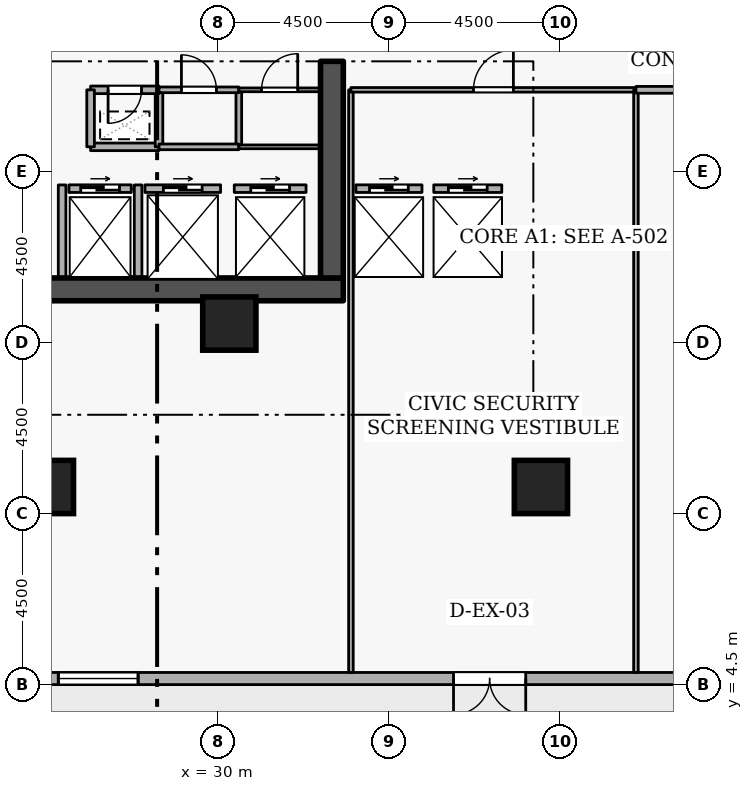
"""IFC4 building model, lengths in metres.
Left out: names, types, materials, properties, quantities, classifications, styles, units other than length and angle.
Written with IfcOpenShell. Run it as: python <this file> out.ifc"""

import sys

from ifc_helpers import new_model, si_unit, direction, frame, frame_2d, origin, origin_2d, place, context, subcontext, project, spatial, rectangle, extrude, element, fill, save


model = new_model("IFC4")
c1 = context("Model", 3, precision=1e-05, world=origin(), true_north=direction((0.0, 1.0)))
c2 = subcontext(c1, "Body", "Model", "MODEL_VIEW")
j1 = project(units=[si_unit("LENGTHUNIT", "METRE"), si_unit("PLANEANGLEUNIT", "RADIAN")], contexts=[c1])
p1 = place(None, origin())
s1 = spatial("IfcSite", under=j1, at=p1, CompositionType="ELEMENT")
p2 = place(p1, origin())
s2 = spatial("IfcBuilding", under=s1, at=p2, CompositionType="ELEMENT")
p3 = place(p2, origin())
s3 = spatial("IfcBuildingStorey", under=s2, at=p3, CompositionType="ELEMENT", Elevation=0.0)
p4 = place(p3, frame((17.7, 14.9, 0.0), z_axis=(0.0, 0.0, 1.0), x_axis=(1.0, 0.0, 0.0)))
e1 = element("IfcWall", 1, at=p4, inside=s3, PredefinedType="SHEAR", context=c2, shape_type="SweptSolid", body=[
    extrude(rectangle(XDim=15.6, YDim=0.6, at=frame_2d((7.8, 0.0))), origin(), (0.0, 0.0, 1.0), 4.8),
])
p5 = place(p3, frame((33.0, 15.2, 0.0), z_axis=(0.0, 0.0, 1.0), x_axis=(0.0, 1.0, 0.0)))
e2 = element("IfcWall", 2, at=p5, inside=s3, PredefinedType="SHEAR", context=c2, shape_type="SweptSolid", body=[
    extrude(rectangle(XDim=5.7, YDim=0.6, at=frame_2d((2.85, 0.0))), origin(), (0.0, 0.0, 1.0), 4.8),
])
for number, where, z_axis, x_axis in (
    (3, (25.5, 9.7, 0.0), (0.0, 0.0, 1.0), (1.0, 0.0, 0.0)),
    (4, (38.5, 9.7, 0.0), (0.0, 0.0, 1.0), (1.0, 0.0, 0.0)),
    (5, (30.3, 14.0, 0.0), (0.0, 0.0, 1.0), (1.0, 0.0, 0.0)),
):
    element("IfcColumn", number, at=place(p3, frame(where, z_axis=z_axis, x_axis=x_axis)), inside=s3, PredefinedType="COLUMN", context=c2, shape_type="SweptSolid", body=[
        extrude(rectangle(XDim=1.4, YDim=1.4, at=origin_2d()), origin(), (0.0, 0.0, 1.0), 4.8),
    ])
p6 = place(p3, frame((3.0, 4.66, 0.0), z_axis=(0.0, 0.0, 1.0), x_axis=(1.0, 0.0, 0.0)))
e6 = element("IfcWall", 6, at=p6, inside=s3, PredefinedType="STANDARD", context=c2, shape_type="SweptSolid", body=[
    extrude(rectangle(XDim=39.4, YDim=0.32, at=frame_2d((19.7, 0.0))), origin(), (0.0, 0.0, 1.0), 3.86),
])
p7 = place(p6, frame((14.3, 0.0, 0.0), z_axis=(0.0, 0.0, 1.0), x_axis=(-1.0, 0.0, 0.0)))
e7 = element("IfcOpeningElement", 7, at=p7, cuts=e6, PredefinedType="OPENING", context=c2, shape_type="SweptSolid", body=[
    extrude(rectangle(XDim=1.9, YDim=2.25, at=frame_2d((0.95, 1.125))), frame((0.0, 0.17, 0.0), z_axis=(0.0, -1.0, 0.0), x_axis=(1.0, 0.0, 0.0)), (0.0, 0.0, 1.0), 0.34),
])
p8 = place(p6, frame((9.1, 0.0, 0.0), z_axis=(0.0, 0.0, 1.0), x_axis=(-1.0, 0.0, 0.0)))
e8 = element("IfcOpeningElement", 8, at=p8, cuts=e6, PredefinedType="OPENING", context=c2, shape_type="SweptSolid", body=[
    extrude(rectangle(XDim=1.9, YDim=2.25, at=frame_2d((0.95, 1.125))), frame((0.0, 0.17, 0.0), z_axis=(0.0, -1.0, 0.0), x_axis=(1.0, 0.0, 0.0)), (0.0, 0.0, 1.0), 0.34),
])
p9 = place(p6, frame((35.1, 0.0, 0.0), z_axis=(0.0, 0.0, 1.0), x_axis=(-1.0, 0.0, 0.0)))
e9 = element("IfcOpeningElement", 9, at=p9, cuts=e6, PredefinedType="OPENING", context=c2, shape_type="SweptSolid", body=[
    extrude(rectangle(XDim=1.9, YDim=2.25, at=frame_2d((0.95, 1.125))), frame((0.0, 0.17, 0.0), z_axis=(0.0, -1.0, 0.0), x_axis=(1.0, 0.0, 0.0)), (0.0, 0.0, 1.0), 0.34),
])
p10 = place(p6, frame((3.0, 0.0, 0.78)))
e10 = element("IfcOpeningElement", 10, at=p10, cuts=e6, PredefinedType="OPENING", context=c2, shape_type="SweptSolid", body=[
    extrude(rectangle(XDim=2.1, YDim=2.4, at=frame_2d((1.05, 1.2))), frame((0.0, 0.17, 0.0), z_axis=(0.0, -1.0, 0.0), x_axis=(1.0, 0.0, 0.0)), (0.0, 0.0, 1.0), 0.34),
])
p11 = place(p6, frame((22.8, 0.0, 0.78)))
e11 = element("IfcOpeningElement", 11, at=p11, cuts=e6, PredefinedType="OPENING", context=c2, shape_type="SweptSolid", body=[
    extrude(rectangle(XDim=2.1, YDim=2.4, at=frame_2d((1.05, 1.2))), frame((0.0, 0.17, 0.0), z_axis=(0.0, -1.0, 0.0), x_axis=(1.0, 0.0, 0.0)), (0.0, 0.0, 1.0), 0.34),
])
p12 = place(p3, frame((26.08, 17.55, 0.0), z_axis=(0.0, 0.0, 1.0), x_axis=(1.0, 0.0, 0.0)))
e12 = element("IfcWall", 12, at=p12, inside=s3, PredefinedType="STANDARD", context=c2, shape_type="SweptSolid", body=[
    extrude(rectangle(XDim=1.64, YDim=0.2, at=frame_2d((0.82, 0.0))), origin(), (0.0, 0.0, 1.0), 4.46),
])
p13 = place(p12, frame((0.31, 0.0, 0.0)))
e13 = element("IfcOpeningElement", 13, at=p13, cuts=e12, PredefinedType="OPENING", context=c2, shape_type="SweptSolid", body=[
    extrude(rectangle(XDim=1.02, YDim=2.06, at=frame_2d((0.51, 1.03))), frame((0.0, 0.11, 0.0), z_axis=(0.0, -1.0, 0.0), x_axis=(1.0, 0.0, 0.0)), (0.0, 0.0, 1.0), 0.22),
])
p14 = place(p3, frame((28.08, 17.55, 0.0), z_axis=(0.0, 0.0, 1.0), x_axis=(1.0, 0.0, 0.0)))
e14 = element("IfcWall", 14, at=p14, inside=s3, PredefinedType="STANDARD", context=c2, shape_type="SweptSolid", body=[
    extrude(rectangle(XDim=1.99, YDim=0.2, at=frame_2d((0.995, 0.0))), origin(), (0.0, 0.0, 1.0), 4.46),
])
p15 = place(p14, frame((0.485, 0.0, 0.0)))
e15 = element("IfcOpeningElement", 15, at=p15, cuts=e14, PredefinedType="OPENING", context=c2, shape_type="SweptSolid", body=[
    extrude(rectangle(XDim=1.02, YDim=2.06, at=frame_2d((0.51, 1.03))), frame((0.0, 0.11, 0.0), z_axis=(0.0, -1.0, 0.0), x_axis=(1.0, 0.0, 0.0)), (0.0, 0.0, 1.0), 0.22),
])
p16 = place(p3, frame((30.43, 17.55, 0.0), z_axis=(0.0, 0.0, 1.0), x_axis=(1.0, 0.0, 0.0)))
e16 = element("IfcWall", 16, at=p16, inside=s3, PredefinedType="STANDARD", context=c2, shape_type="SweptSolid", body=[
    extrude(rectangle(XDim=1.89, YDim=0.2, at=frame_2d((0.945, 0.0))), origin(), (0.0, 0.0, 1.0), 4.46),
])
p17 = place(p16, frame((0.435, 0.0, 0.0)))
e17 = element("IfcOpeningElement", 17, at=p17, cuts=e16, PredefinedType="OPENING", context=c2, shape_type="SweptSolid", body=[
    extrude(rectangle(XDim=1.02, YDim=2.06, at=frame_2d((0.51, 1.03))), frame((0.0, 0.11, 0.0), z_axis=(0.0, -1.0, 0.0), x_axis=(1.0, 0.0, 0.0)), (0.0, 0.0, 1.0), 0.22),
])
p18 = place(p3, frame((33.63, 17.55, 0.0), z_axis=(0.0, 0.0, 1.0), x_axis=(1.0, 0.0, 0.0)))
e18 = element("IfcWall", 18, at=p18, inside=s3, PredefinedType="STANDARD", context=c2, shape_type="SweptSolid", body=[
    extrude(rectangle(XDim=1.74, YDim=0.2, at=frame_2d((0.87, 0.0))), origin(), (0.0, 0.0, 1.0), 4.46),
])
p19 = place(p18, frame((0.36, 0.0, 0.0)))
e19 = element("IfcOpeningElement", 19, at=p19, cuts=e18, PredefinedType="OPENING", context=c2, shape_type="SweptSolid", body=[
    extrude(rectangle(XDim=1.02, YDim=2.06, at=frame_2d((0.51, 1.03))), frame((0.0, 0.11, 0.0), z_axis=(0.0, -1.0, 0.0), x_axis=(1.0, 0.0, 0.0)), (0.0, 0.0, 1.0), 0.22),
])
p20 = place(p3, frame((35.68, 17.55, 0.0), z_axis=(0.0, 0.0, 1.0), x_axis=(1.0, 0.0, 0.0)))
e20 = element("IfcWall", 20, at=p20, inside=s3, PredefinedType="STANDARD", context=c2, shape_type="SweptSolid", body=[
    extrude(rectangle(XDim=1.79, YDim=0.2, at=frame_2d((0.895, 0.0))), origin(), (0.0, 0.0, 1.0), 4.46),
])
p21 = place(p20, frame((0.385, 0.0, 0.0)))
e21 = element("IfcOpeningElement", 21, at=p21, cuts=e20, PredefinedType="OPENING", context=c2, shape_type="SweptSolid", body=[
    extrude(rectangle(XDim=1.02, YDim=2.06, at=frame_2d((0.51, 1.03))), frame((0.0, 0.11, 0.0), z_axis=(0.0, -1.0, 0.0), x_axis=(1.0, 0.0, 0.0)), (0.0, 0.0, 1.0), 0.22),
])
for number, where, z_axis, x_axis in (
    (22, (27.9, 15.212, 0.0), (0.0, 0.0, 1.0), (0.0, 1.0, 0.0)),
    (23, (25.9, 15.212, 0.0), (0.0, 0.0, 1.0), (0.0, 1.0, 0.0)),
):
    element("IfcWall", number, at=place(p3, frame(where, z_axis=z_axis, x_axis=x_axis)), inside=s3, PredefinedType="STANDARD", context=c2, shape_type="SweptSolid", body=[
        extrude(rectangle(XDim=2.436, YDim=0.2, at=frame_2d((1.218, 0.0))), origin(), (0.0, 0.0, 1.0), 4.46),
    ])
p22 = place(p3, frame((26.65, 18.65, 0.0), z_axis=(0.0, 0.0, 1.0), x_axis=(1.0, 0.0, 0.0)))
e24 = element("IfcWall", 24, at=p22, inside=s3, PredefinedType="STANDARD", context=c2, shape_type="SweptSolid", body=[
    extrude(rectangle(XDim=1.8, YDim=0.2, at=frame_2d((0.9, 0.0))), origin(), (0.0, 0.0, 1.0), 4.46),
])
p23 = place(p3, frame((28.45, 18.65, 0.0), z_axis=(0.0, 0.0, 1.0), x_axis=(0.0, 1.0, 0.0)))
e25 = element("IfcWall", 25, at=p23, inside=s3, PredefinedType="STANDARD", context=c2, shape_type="SweptSolid", body=[
    extrude(rectangle(XDim=1.5, YDim=0.2, at=frame_2d((0.75, 0.0))), origin(), (0.0, 0.0, 1.0), 4.46),
])
p24 = place(p3, frame((28.45, 20.15, 0.0), z_axis=(0.0, 0.0, 1.0), x_axis=(-1.0, 0.0, 0.0)))
e26 = element("IfcWall", 26, at=p24, inside=s3, PredefinedType="STANDARD", context=c2, shape_type="SweptSolid", body=[
    extrude(rectangle(XDim=1.8, YDim=0.2, at=frame_2d((0.9, 0.0))), origin(), (0.0, 0.0, 1.0), 4.46),
])
p25 = place(p24, frame((0.46, 0.0, 0.0)))
e27 = element("IfcOpeningElement", 27, at=p25, cuts=e26, PredefinedType="OPENING", context=c2, shape_type="SweptSolid", body=[
    extrude(rectangle(XDim=0.88, YDim=2.04, at=frame_2d((0.44, 1.02))), frame((0.0, 0.11, 0.0), z_axis=(0.0, -1.0, 0.0), x_axis=(1.0, 0.0, 0.0)), (0.0, 0.0, 1.0), 0.22),
])
p26 = place(p3, frame((26.65, 20.15, 0.0), z_axis=(0.0, 0.0, 1.0), x_axis=(0.0, -1.0, 0.0)))
e28 = element("IfcWall", 28, at=p26, inside=s3, PredefinedType="STANDARD", context=c2, shape_type="SweptSolid", body=[
    extrude(rectangle(XDim=1.5, YDim=0.2, at=frame_2d((0.75, 0.0))), origin(), (0.0, 0.0, 1.0), 4.46),
])
p27 = place(p3, frame((30.55, 20.15, 0.0), z_axis=(0.0, 0.0, 1.0), x_axis=(0.0, -1.0, 0.0)))
e29 = element("IfcWall", 29, at=p27, inside=s3, PredefinedType="PARTITIONING", context=c2, shape_type="SweptSolid", body=[
    extrude(rectangle(XDim=1.5, YDim=0.15, at=frame_2d((0.75, 0.0))), origin(), (0.0, 0.0, 1.0), 4.46),
])
p28 = place(p3, frame((30.55, 18.65, 0.0), z_axis=(0.0, 0.0, 1.0), x_axis=(-1.0, 0.0, 0.0)))
e30 = element("IfcWall", 30, at=p28, inside=s3, PredefinedType="PARTITIONING", context=c2, shape_type="SweptSolid", body=[
    extrude(rectangle(XDim=2.1, YDim=0.15, at=frame_2d((1.05, 0.0))), origin(), (0.0, 0.0, 1.0), 4.46),
])
p29 = place(p3, frame((28.45, 20.15, 0.0), z_axis=(0.0, 0.0, 1.0), x_axis=(1.0, 0.0, 0.0)))
e31 = element("IfcWall", 31, at=p29, inside=s3, PredefinedType="PARTITIONING", context=c2, shape_type="SweptSolid", body=[
    extrude(rectangle(XDim=2.1, YDim=0.15, at=frame_2d((1.05, 0.0))), origin(), (0.0, 0.0, 1.0), 4.46),
])
p30 = place(p29, frame((0.59, 0.0, 0.0)))
e32 = element("IfcOpeningElement", 32, at=p30, cuts=e31, PredefinedType="OPENING", context=c2, shape_type="SweptSolid", body=[
    extrude(rectangle(XDim=0.92, YDim=2.08, at=frame_2d((0.46, 1.04))), frame((0.0, 0.085, 0.0), z_axis=(0.0, -1.0, 0.0), x_axis=(1.0, 0.0, 0.0)), (0.0, 0.0, 1.0), 0.17),
])
p31 = place(p3, frame((32.7, 18.65, 0.0), z_axis=(0.0, 0.0, 1.0), x_axis=(-1.0, 0.0, 0.0)))
e33 = element("IfcWall", 33, at=p31, inside=s3, PredefinedType="PARTITIONING", context=c2, shape_type="SweptSolid", body=[
    extrude(rectangle(XDim=2.15, YDim=0.1, at=frame_2d((1.075, 0.0))), origin(), (0.0, 0.0, 1.0), 4.46),
])
p32 = place(p3, frame((30.55, 20.15, 0.0), z_axis=(0.0, 0.0, 1.0), x_axis=(1.0, 0.0, 0.0)))
e34 = element("IfcWall", 34, at=p32, inside=s3, PredefinedType="PARTITIONING", context=c2, shape_type="SweptSolid", body=[
    extrude(rectangle(XDim=2.15, YDim=0.1, at=frame_2d((1.075, 0.0))), origin(), (0.0, 0.0, 1.0), 4.46),
])
p33 = place(p32, frame((0.6, 0.0, 0.0)))
e35 = element("IfcOpeningElement", 35, at=p33, cuts=e34, PredefinedType="OPENING", context=c2, shape_type="SweptSolid", body=[
    extrude(rectangle(XDim=0.95, YDim=2.1, at=frame_2d((0.475, 1.05))), frame((0.0, 0.06, 0.0), z_axis=(0.0, -1.0, 0.0), x_axis=(1.0, 0.0, 0.0)), (0.0, 0.0, 1.0), 0.12),
])
p34 = place(p3, frame((33.5, 4.82, 0.0), z_axis=(0.0, 0.0, 1.0), x_axis=(0.0, 1.0, 0.0)))
e36 = element("IfcWall", 36, at=p34, inside=s3, PredefinedType="PARTITIONING", context=c2, shape_type="SweptSolid", body=[
    extrude(rectangle(XDim=15.33, YDim=0.12, at=frame_2d((7.665, 0.0))), origin(), (0.0, 0.0, 1.0), 4.46),
])
p35 = place(p3, frame((33.5, 20.15, 0.0), z_axis=(0.0, 0.0, 1.0), x_axis=(1.0, 0.0, 0.0)))
e37 = element("IfcWall", 37, at=p35, inside=s3, PredefinedType="PARTITIONING", context=c2, shape_type="SweptSolid", body=[
    extrude(rectangle(XDim=7.5, YDim=0.12, at=frame_2d((3.75, 0.0))), origin(), (0.0, 0.0, 1.0), 4.46),
])
p36 = place(p35, frame((3.225, 0.0, 0.0)))
e38 = element("IfcOpeningElement", 38, at=p36, cuts=e37, PredefinedType="OPENING", context=c2, shape_type="SweptSolid", body=[
    extrude(rectangle(XDim=1.05, YDim=2.1, at=frame_2d((0.525, 1.05))), frame((0.0, 0.07, 0.0), z_axis=(0.0, -1.0, 0.0), x_axis=(1.0, 0.0, 0.0)), (0.0, 0.0, 1.0), 0.14),
])
p37 = place(p3, frame((41.0, 20.15, 0.0), z_axis=(0.0, 0.0, 1.0), x_axis=(0.0, -1.0, 0.0)))
e39 = element("IfcWall", 39, at=p37, inside=s3, PredefinedType="PARTITIONING", context=c2, shape_type="SweptSolid", body=[
    extrude(rectangle(XDim=15.33, YDim=0.12, at=frame_2d((7.665, 0.0))), origin(), (0.0, 0.0, 1.0), 4.46),
])
p38 = place(p3, frame((41.0, 20.15, 0.0), z_axis=(0.0, 0.0, 1.0), x_axis=(1.0, 0.0, 0.0)))
e40 = element("IfcWall", 40, at=p38, inside=s3, PredefinedType="PARTITIONING", context=c2, shape_type="SweptSolid", body=[
    extrude(rectangle(XDim=26.5, YDim=0.18, at=frame_2d((13.25, 0.0))), origin(), (0.0, 0.0, 1.0), 4.46),
])
p39 = place(p38, frame((12.5, 0.0, 0.0)))
e41 = element("IfcOpeningElement", 41, at=p39, cuts=e40, PredefinedType="OPENING", context=c2, shape_type="SweptSolid", body=[
    extrude(rectangle(XDim=1.5, YDim=2.15, at=frame_2d((0.75, 1.075))), frame((0.0, 0.1, 0.0), z_axis=(0.0, -1.0, 0.0), x_axis=(1.0, 0.0, 0.0)), (0.0, 0.0, 1.0), 0.2),
])
p40 = place(p9, origin())
e42 = element("IfcDoor", 42, at=p40, inside=s3, OperationType="DOUBLE_DOOR_SINGLE_SWING", PredefinedType="DOOR", context=c2, shape_type="SweptSolid", body=[
    extrude(rectangle(XDim=1.9, YDim=2.25, at=frame_2d((0.95, 1.125))), frame((0.0, 0.025, 0.0), z_axis=(0.0, -1.0, 0.0), x_axis=(1.0, 0.0, 0.0)), (0.0, 0.0, 1.0), 0.05),
])
fill(e9, e42)
p41 = place(p11, origin())
e43 = element("IfcWindow", 43, at=p41, inside=s3, PartitioningType="SINGLE_PANEL", PredefinedType="WINDOW", context=c2, shape_type="SweptSolid", body=[
    extrude(rectangle(XDim=2.1, YDim=2.4, at=frame_2d((1.05, 1.2))), frame((0.0, 0.03, 0.0), z_axis=(0.0, -1.0, 0.0), x_axis=(1.0, 0.0, 0.0)), (0.0, 0.0, 1.0), 0.06),
])
fill(e11, e43)
p42 = place(p13, origin())
e44 = element("IfcDoor", 44, at=p42, inside=s3, OperationType="SLIDING_TO_LEFT", PredefinedType="DOOR", context=c2, shape_type="SweptSolid", body=[
    extrude(rectangle(XDim=1.02, YDim=2.06, at=frame_2d((0.51, 1.03))), frame((0.0, 0.025, 0.0), z_axis=(0.0, -1.0, 0.0), x_axis=(1.0, 0.0, 0.0)), (0.0, 0.0, 1.0), 0.05),
])
fill(e13, e44)
p43 = place(p15, origin())
e45 = element("IfcDoor", 45, at=p43, inside=s3, OperationType="SLIDING_TO_LEFT", PredefinedType="DOOR", context=c2, shape_type="SweptSolid", body=[
    extrude(rectangle(XDim=1.02, YDim=2.06, at=frame_2d((0.51, 1.03))), frame((0.0, 0.025, 0.0), z_axis=(0.0, -1.0, 0.0), x_axis=(1.0, 0.0, 0.0)), (0.0, 0.0, 1.0), 0.05),
])
fill(e15, e45)
p44 = place(p17, origin())
e46 = element("IfcDoor", 46, at=p44, inside=s3, OperationType="SLIDING_TO_LEFT", PredefinedType="DOOR", context=c2, shape_type="SweptSolid", body=[
    extrude(rectangle(XDim=1.02, YDim=2.06, at=frame_2d((0.51, 1.03))), frame((0.0, 0.025, 0.0), z_axis=(0.0, -1.0, 0.0), x_axis=(1.0, 0.0, 0.0)), (0.0, 0.0, 1.0), 0.05),
])
fill(e17, e46)
p45 = place(p19, origin())
e47 = element("IfcDoor", 47, at=p45, inside=s3, OperationType="SLIDING_TO_LEFT", PredefinedType="DOOR", context=c2, shape_type="SweptSolid", body=[
    extrude(rectangle(XDim=1.02, YDim=2.06, at=frame_2d((0.51, 1.03))), frame((0.0, 0.025, 0.0), z_axis=(0.0, -1.0, 0.0), x_axis=(1.0, 0.0, 0.0)), (0.0, 0.0, 1.0), 0.05),
])
fill(e19, e47)
p46 = place(p21, origin())
e48 = element("IfcDoor", 48, at=p46, inside=s3, OperationType="SLIDING_TO_LEFT", PredefinedType="DOOR", context=c2, shape_type="SweptSolid", body=[
    extrude(rectangle(XDim=1.02, YDim=2.06, at=frame_2d((0.51, 1.03))), frame((0.0, 0.025, 0.0), z_axis=(0.0, -1.0, 0.0), x_axis=(1.0, 0.0, 0.0)), (0.0, 0.0, 1.0), 0.05),
])
fill(e21, e48)
p47 = place(p25, origin())
e49 = element("IfcDoor", 49, at=p47, inside=s3, OperationType="SINGLE_SWING_RIGHT", PredefinedType="DOOR", context=c2, shape_type="SweptSolid", body=[
    extrude(rectangle(XDim=0.88, YDim=2.04, at=frame_2d((0.44, 1.02))), frame((0.0, 0.025, 0.0), z_axis=(0.0, -1.0, 0.0), x_axis=(1.0, 0.0, 0.0)), (0.0, 0.0, 1.0), 0.05),
])
fill(e27, e49)
p48 = place(p30, origin())
e50 = element("IfcDoor", 50, at=p48, inside=s3, OperationType="SINGLE_SWING_LEFT", PredefinedType="DOOR", context=c2, shape_type="SweptSolid", body=[
    extrude(rectangle(XDim=0.92, YDim=2.08, at=frame_2d((0.46, 1.04))), frame((0.0, 0.025, 0.0), z_axis=(0.0, -1.0, 0.0), x_axis=(1.0, 0.0, 0.0)), (0.0, 0.0, 1.0), 0.05),
])
fill(e32, e50)
p49 = place(p33, origin())
e51 = element("IfcDoor", 51, at=p49, inside=s3, OperationType="SINGLE_SWING_RIGHT", PredefinedType="DOOR", context=c2, shape_type="SweptSolid", body=[
    extrude(rectangle(XDim=0.95, YDim=2.1, at=frame_2d((0.475, 1.05))), frame((0.0, 0.025, 0.0), z_axis=(0.0, -1.0, 0.0), x_axis=(1.0, 0.0, 0.0)), (0.0, 0.0, 1.0), 0.05),
])
fill(e35, e51)
p50 = place(p36, origin())
e52 = element("IfcDoor", 52, at=p50, inside=s3, OperationType="SINGLE_SWING_RIGHT", PredefinedType="DOOR", context=c2, shape_type="SweptSolid", body=[
    extrude(rectangle(XDim=1.05, YDim=2.1, at=frame_2d((0.525, 1.05))), frame((0.0, 0.025, 0.0), z_axis=(0.0, -1.0, 0.0), x_axis=(1.0, 0.0, 0.0)), (0.0, 0.0, 1.0), 0.05),
])
fill(e38, e52)
save(model, sys.argv[1])
